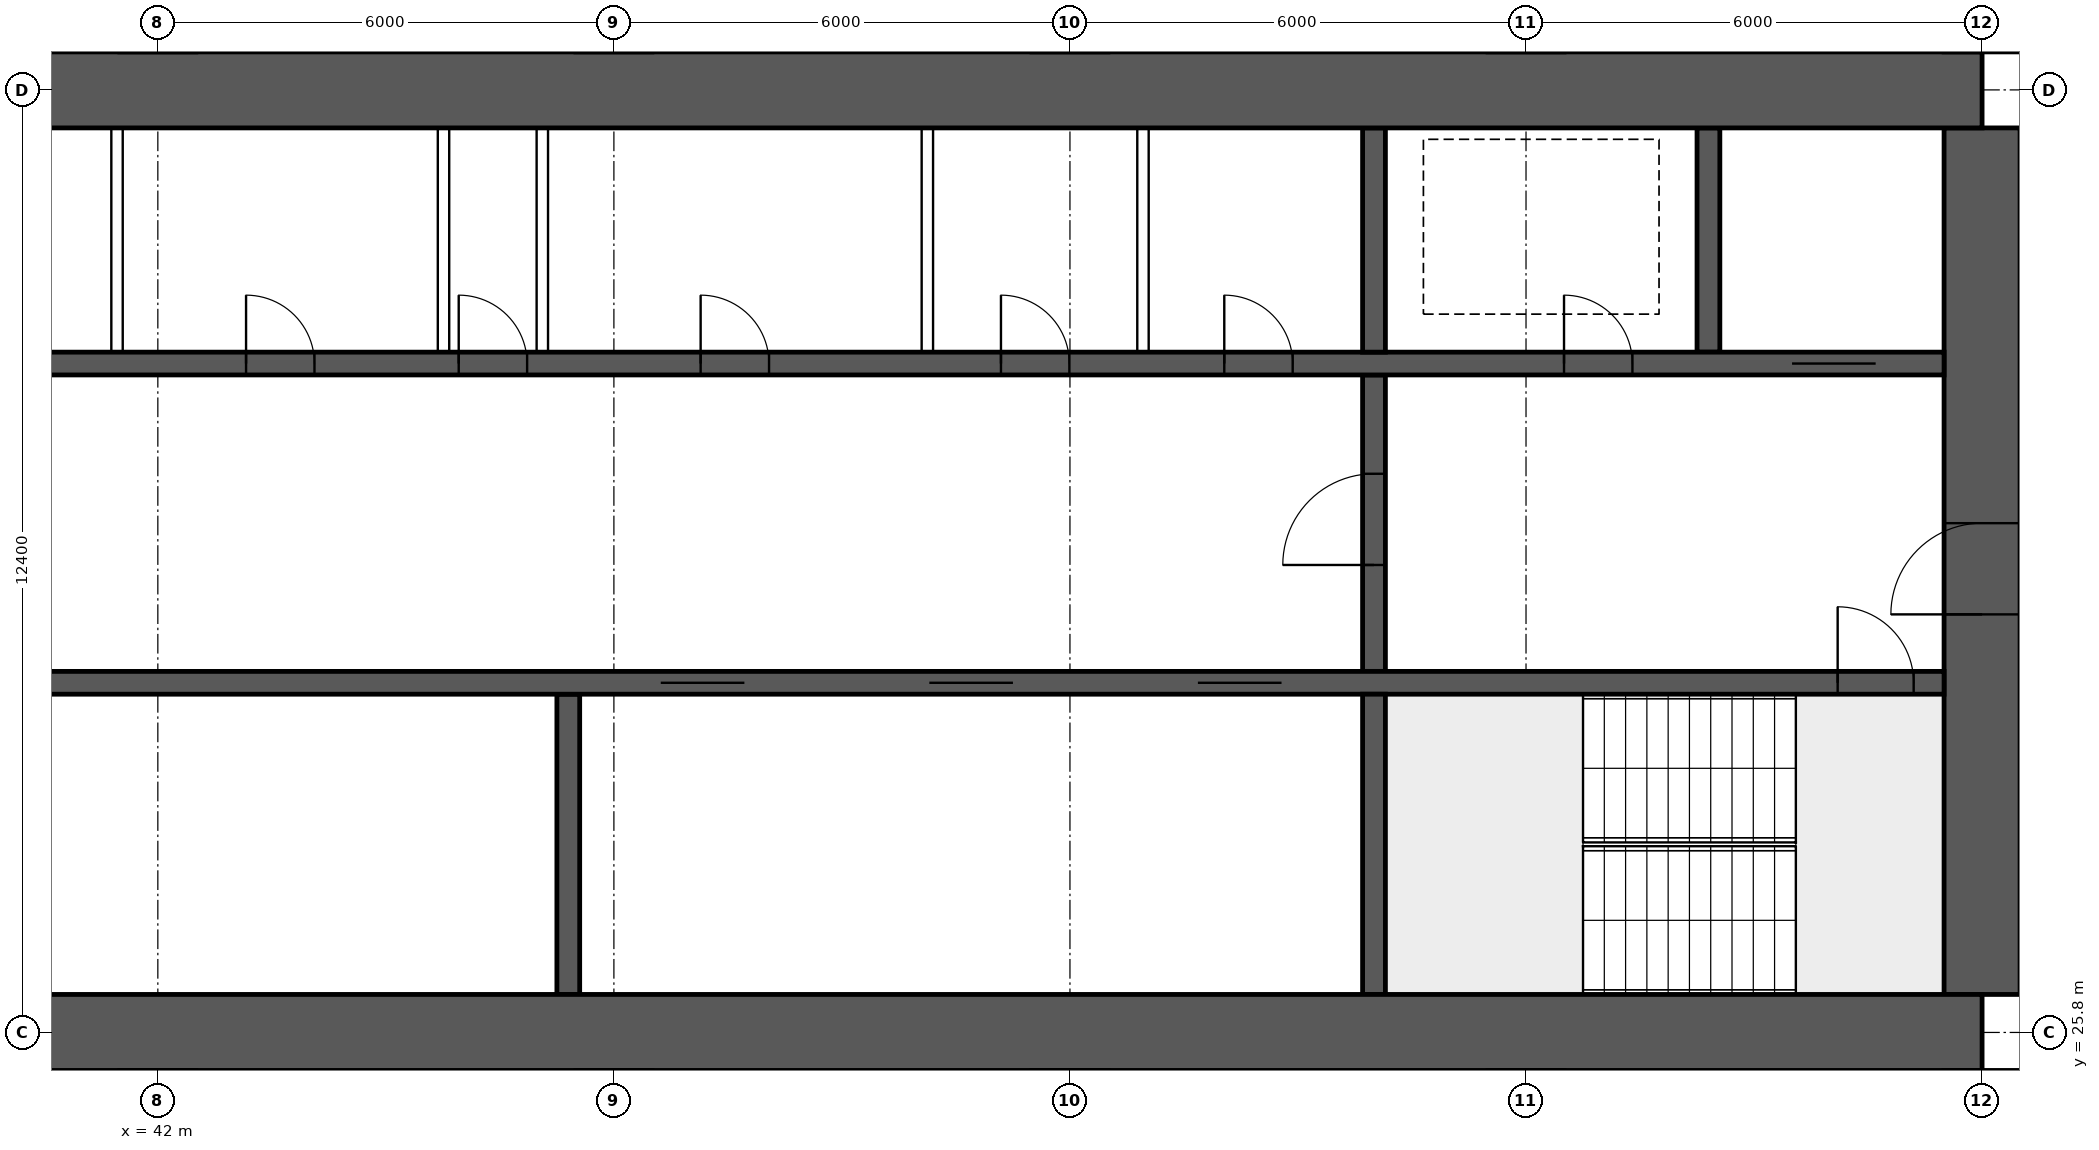
"""IFC4 building model, lengths in metres.
Left out: names, types, materials, properties, quantities, classifications, styles, units other than length and angle.
Written with IfcOpenShell. Run it as: python <this file> out.ifc"""

import sys

from ifc_helpers import new_model, si_unit, direction, frame, frame_2d, origin, place, context, subcontext, project, spatial, rectangle, extrude, element, fill, save


model = new_model("IFC4")
c1 = context("Model", 3, precision=1e-05, world=origin(), true_north=direction((0.0, 1.0)))
c2 = subcontext(c1, "Body", "Model", "MODEL_VIEW")
j1 = project(units=[si_unit("LENGTHUNIT", "METRE"), si_unit("PLANEANGLEUNIT", "RADIAN")], contexts=[c1])
p1 = place(None, origin())
s1 = spatial("IfcSite", under=j1, at=p1, CompositionType="ELEMENT")
p2 = place(p1, origin())
s2 = spatial("IfcBuilding", under=s1, at=p2, CompositionType="ELEMENT")
p3 = place(p2, frame((0.0, 0.0, 42.7)))
s3 = spatial("IfcBuildingStorey", under=s2, at=p3, CompositionType="ELEMENT", Elevation=42.7)
for number, where, z_axis, x_axis in (
    (1, (18.0, 25.8, 0.0), (0.0, 0.0, 1.0), (1.0, 0.0, 0.0)),
    (2, (18.0, 38.2, 0.0), (0.0, 0.0, 1.0), (1.0, 0.0, 0.0)),
):
    element("IfcWall", number, at=place(p3, frame(where, z_axis=z_axis, x_axis=x_axis)), inside=s3, PredefinedType="SHEAR", context=c2, shape_type="SweptSolid", body=[
        extrude(rectangle(XDim=48.0, YDim=1.0, at=frame_2d((24.0, 0.0))), origin(), (0.0, 0.0, 1.0), 3.75),
    ])
p4 = place(p3, frame((66.0, 26.3, 0.0), z_axis=(0.0, 0.0, 1.0), x_axis=(0.0, 1.0, 0.0)))
e3 = element("IfcWall", 3, at=p4, inside=s3, PredefinedType="SHEAR", context=c2, shape_type="SweptSolid", body=[
    extrude(rectangle(XDim=11.4, YDim=1.0, at=frame_2d((5.7, 0.0))), origin(), (0.0, 0.0, 1.0), 3.75),
])
p5 = place(p4, frame((5.0, 0.0, 0.0)))
e4 = element("IfcOpeningElement", 4, at=p5, cuts=e3, PredefinedType="OPENING", context=c2, shape_type="SweptSolid", body=[
    extrude(rectangle(XDim=1.2, YDim=2.1, at=frame_2d((0.6, 1.05))), frame((0.0, 0.51, 0.0), z_axis=(0.0, -1.0, 0.0), x_axis=(1.0, 0.0, 0.0)), (0.0, 0.0, 1.0), 1.02),
])
p6 = place(p3, frame((18.5, 30.4, 0.0), z_axis=(0.0, 0.0, 1.0), x_axis=(1.0, 0.0, 0.0)))
e5 = element("IfcWall", 5, at=p6, inside=s3, PredefinedType="SHEAR", context=c2, shape_type="SweptSolid", body=[
    extrude(rectangle(XDim=47.0, YDim=0.3, at=frame_2d((23.5, 0.0))), origin(), (0.0, 0.0, 1.0), 3.75),
])
p7 = place(p6, frame((0.4, 0.0, 0.0)))
e6 = element("IfcOpeningElement", 6, at=p7, cuts=e5, PredefinedType="OPENING", context=c2, shape_type="SweptSolid", body=[
    extrude(rectangle(XDim=1.0, YDim=2.1, at=frame_2d((0.5, 1.05))), frame((0.0, 0.16, 0.0), z_axis=(0.0, -1.0, 0.0), x_axis=(1.0, 0.0, 0.0)), (0.0, 0.0, 1.0), 0.32),
])
p8 = place(p6, frame((45.6, 0.0, 0.0)))
e7 = element("IfcOpeningElement", 7, at=p8, cuts=e5, PredefinedType="OPENING", context=c2, shape_type="SweptSolid", body=[
    extrude(rectangle(XDim=1.0, YDim=2.1, at=frame_2d((0.5, 1.05))), frame((0.0, 0.16, 0.0), z_axis=(0.0, -1.0, 0.0), x_axis=(1.0, 0.0, 0.0)), (0.0, 0.0, 1.0), 0.32),
])
p9 = place(p6, frame((8.25, 0.0, 0.0)))
e8 = element("IfcOpeningElement", 8, at=p9, cuts=e5, PredefinedType="OPENING", context=c2, shape_type="SweptSolid", body=[
    extrude(rectangle(XDim=1.1, YDim=2.1, at=frame_2d((0.55, 1.05))), frame((0.0, 0.16, 0.0), z_axis=(0.0, -1.0, 0.0), x_axis=(1.0, 0.0, 0.0)), (0.0, 0.0, 1.0), 0.32),
])
p10 = place(p6, frame((10.85, 0.0, 0.0)))
e9 = element("IfcOpeningElement", 9, at=p10, cuts=e5, PredefinedType="OPENING", context=c2, shape_type="SweptSolid", body=[
    extrude(rectangle(XDim=1.1, YDim=2.1, at=frame_2d((0.55, 1.05))), frame((0.0, 0.16, 0.0), z_axis=(0.0, -1.0, 0.0), x_axis=(1.0, 0.0, 0.0)), (0.0, 0.0, 1.0), 0.32),
])
p11 = place(p6, frame((13.45, 0.0, 0.0)))
e10 = element("IfcOpeningElement", 10, at=p11, cuts=e5, PredefinedType="OPENING", context=c2, shape_type="SweptSolid", body=[
    extrude(rectangle(XDim=1.1, YDim=2.1, at=frame_2d((0.55, 1.05))), frame((0.0, 0.16, 0.0), z_axis=(0.0, -1.0, 0.0), x_axis=(1.0, 0.0, 0.0)), (0.0, 0.0, 1.0), 0.32),
])
p12 = place(p6, frame((16.05, 0.0, 0.0)))
e11 = element("IfcOpeningElement", 11, at=p12, cuts=e5, PredefinedType="OPENING", context=c2, shape_type="SweptSolid", body=[
    extrude(rectangle(XDim=1.1, YDim=2.1, at=frame_2d((0.55, 1.05))), frame((0.0, 0.16, 0.0), z_axis=(0.0, -1.0, 0.0), x_axis=(1.0, 0.0, 0.0)), (0.0, 0.0, 1.0), 0.32),
])
p13 = place(p6, frame((30.117, 0.0, 0.0)))
e12 = element("IfcOpeningElement", 12, at=p13, cuts=e5, PredefinedType="OPENING", context=c2, shape_type="SweptSolid", body=[
    extrude(rectangle(XDim=1.1, YDim=2.1, at=frame_2d((0.55, 1.05))), frame((0.0, 0.16, 0.0), z_axis=(0.0, -1.0, 0.0), x_axis=(1.0, 0.0, 0.0)), (0.0, 0.0, 1.0), 0.32),
])
p14 = place(p6, frame((33.65, 0.0, 0.0)))
e13 = element("IfcOpeningElement", 13, at=p14, cuts=e5, PredefinedType="OPENING", context=c2, shape_type="SweptSolid", body=[
    extrude(rectangle(XDim=1.1, YDim=2.1, at=frame_2d((0.55, 1.05))), frame((0.0, 0.16, 0.0), z_axis=(0.0, -1.0, 0.0), x_axis=(1.0, 0.0, 0.0)), (0.0, 0.0, 1.0), 0.32),
])
p15 = place(p6, frame((37.183, 0.0, 0.0)))
e14 = element("IfcOpeningElement", 14, at=p15, cuts=e5, PredefinedType="OPENING", context=c2, shape_type="SweptSolid", body=[
    extrude(rectangle(XDim=1.1, YDim=2.1, at=frame_2d((0.55, 1.05))), frame((0.0, 0.16, 0.0), z_axis=(0.0, -1.0, 0.0), x_axis=(1.0, 0.0, 0.0)), (0.0, 0.0, 1.0), 0.32),
])
p16 = place(p3, frame((18.5, 34.6, 0.0), z_axis=(0.0, 0.0, 1.0), x_axis=(1.0, 0.0, 0.0)))
e15 = element("IfcWall", 15, at=p16, inside=s3, PredefinedType="SHEAR", context=c2, shape_type="SweptSolid", body=[
    extrude(rectangle(XDim=47.0, YDim=0.3, at=frame_2d((23.5, 0.0))), origin(), (0.0, 0.0, 1.0), 3.75),
])
p17 = place(p16, frame((0.9, 0.0, 0.0)))
e16 = element("IfcOpeningElement", 16, at=p17, cuts=e15, PredefinedType="OPENING", context=c2, shape_type="SweptSolid", body=[
    extrude(rectangle(XDim=1.1, YDim=2.1, at=frame_2d((0.55, 1.05))), frame((0.0, 0.16, 0.0), z_axis=(0.0, -1.0, 0.0), x_axis=(1.0, 0.0, 0.0)), (0.0, 0.0, 1.0), 0.32),
])
p18 = place(p16, frame((45.0, 0.0, 0.0)))
e17 = element("IfcOpeningElement", 17, at=p18, cuts=e15, PredefinedType="OPENING", context=c2, shape_type="SweptSolid", body=[
    extrude(rectangle(XDim=1.1, YDim=2.1, at=frame_2d((0.55, 1.05))), frame((0.0, 0.16, 0.0), z_axis=(0.0, -1.0, 0.0), x_axis=(1.0, 0.0, 0.0)), (0.0, 0.0, 1.0), 0.32),
])
p19 = place(p16, frame((4.1, 0.0, 0.0)))
e18 = element("IfcOpeningElement", 18, at=p19, cuts=e15, PredefinedType="OPENING", context=c2, shape_type="SweptSolid", body=[
    extrude(rectangle(XDim=0.9, YDim=2.1, at=frame_2d((0.45, 1.05))), frame((0.0, 0.16, 0.0), z_axis=(0.0, -1.0, 0.0), x_axis=(1.0, 0.0, 0.0)), (0.0, 0.0, 1.0), 0.32),
])
p20 = place(p16, frame((42.0, 0.0, 0.0)))
e19 = element("IfcOpeningElement", 19, at=p20, cuts=e15, PredefinedType="OPENING", context=c2, shape_type="SweptSolid", body=[
    extrude(rectangle(XDim=0.9, YDim=2.1, at=frame_2d((0.45, 1.05))), frame((0.0, 0.16, 0.0), z_axis=(0.0, -1.0, 0.0), x_axis=(1.0, 0.0, 0.0)), (0.0, 0.0, 1.0), 0.32),
])
p21 = place(p16, frame((8.875, 0.0, 0.0)))
e20 = element("IfcOpeningElement", 20, at=p21, cuts=e15, PredefinedType="OPENING", context=c2, shape_type="SweptSolid", body=[
    extrude(rectangle(XDim=0.9, YDim=2.1, at=frame_2d((0.45, 1.05))), frame((0.0, 0.16, 0.0), z_axis=(0.0, -1.0, 0.0), x_axis=(1.0, 0.0, 0.0)), (0.0, 0.0, 1.0), 0.32),
])
p22 = place(p16, frame((12.849, 0.0, 0.0)))
e21 = element("IfcOpeningElement", 21, at=p22, cuts=e15, PredefinedType="OPENING", context=c2, shape_type="SweptSolid", body=[
    extrude(rectangle(XDim=0.9, YDim=2.1, at=frame_2d((0.45, 1.05))), frame((0.0, 0.16, 0.0), z_axis=(0.0, -1.0, 0.0), x_axis=(1.0, 0.0, 0.0)), (0.0, 0.0, 1.0), 0.32),
])
p23 = place(p16, frame((16.496, 0.0, 0.0)))
e22 = element("IfcOpeningElement", 22, at=p23, cuts=e15, PredefinedType="OPENING", context=c2, shape_type="SweptSolid", body=[
    extrude(rectangle(XDim=0.9, YDim=2.1, at=frame_2d((0.45, 1.05))), frame((0.0, 0.16, 0.0), z_axis=(0.0, -1.0, 0.0), x_axis=(1.0, 0.0, 0.0)), (0.0, 0.0, 1.0), 0.32),
])
p24 = place(p16, frame((20.255, 0.0, 0.0)))
e23 = element("IfcOpeningElement", 23, at=p24, cuts=e15, PredefinedType="OPENING", context=c2, shape_type="SweptSolid", body=[
    extrude(rectangle(XDim=0.9, YDim=2.1, at=frame_2d((0.45, 1.05))), frame((0.0, 0.16, 0.0), z_axis=(0.0, -1.0, 0.0), x_axis=(1.0, 0.0, 0.0)), (0.0, 0.0, 1.0), 0.32),
])
p25 = place(p16, frame((24.661, 0.0, 0.0)))
e24 = element("IfcOpeningElement", 24, at=p25, cuts=e15, PredefinedType="OPENING", context=c2, shape_type="SweptSolid", body=[
    extrude(rectangle(XDim=0.9, YDim=2.1, at=frame_2d((0.45, 1.05))), frame((0.0, 0.16, 0.0), z_axis=(0.0, -1.0, 0.0), x_axis=(1.0, 0.0, 0.0)), (0.0, 0.0, 1.0), 0.32),
])
p26 = place(p16, frame((27.458, 0.0, 0.0)))
e25 = element("IfcOpeningElement", 25, at=p26, cuts=e15, PredefinedType="OPENING", context=c2, shape_type="SweptSolid", body=[
    extrude(rectangle(XDim=0.9, YDim=2.1, at=frame_2d((0.45, 1.05))), frame((0.0, 0.16, 0.0), z_axis=(0.0, -1.0, 0.0), x_axis=(1.0, 0.0, 0.0)), (0.0, 0.0, 1.0), 0.32),
])
p27 = place(p16, frame((30.641, 0.0, 0.0)))
e26 = element("IfcOpeningElement", 26, at=p27, cuts=e15, PredefinedType="OPENING", context=c2, shape_type="SweptSolid", body=[
    extrude(rectangle(XDim=0.9, YDim=2.1, at=frame_2d((0.45, 1.05))), frame((0.0, 0.16, 0.0), z_axis=(0.0, -1.0, 0.0), x_axis=(1.0, 0.0, 0.0)), (0.0, 0.0, 1.0), 0.32),
])
p28 = place(p16, frame((34.592, 0.0, 0.0)))
e27 = element("IfcOpeningElement", 27, at=p28, cuts=e15, PredefinedType="OPENING", context=c2, shape_type="SweptSolid", body=[
    extrude(rectangle(XDim=0.9, YDim=2.1, at=frame_2d((0.45, 1.05))), frame((0.0, 0.16, 0.0), z_axis=(0.0, -1.0, 0.0), x_axis=(1.0, 0.0, 0.0)), (0.0, 0.0, 1.0), 0.32),
])
p29 = place(p16, frame((37.53, 0.0, 0.0)))
e28 = element("IfcOpeningElement", 28, at=p29, cuts=e15, PredefinedType="OPENING", context=c2, shape_type="SweptSolid", body=[
    extrude(rectangle(XDim=0.9, YDim=2.1, at=frame_2d((0.45, 1.05))), frame((0.0, 0.16, 0.0), z_axis=(0.0, -1.0, 0.0), x_axis=(1.0, 0.0, 0.0)), (0.0, 0.0, 1.0), 0.32),
])
p30 = place(p3, frame((58.0, 26.3, 0.0), z_axis=(0.0, 0.0, 1.0), x_axis=(0.0, 1.0, 0.0)))
e29 = element("IfcWall", 29, at=p30, inside=s3, PredefinedType="SHEAR", context=c2, shape_type="SweptSolid", body=[
    extrude(rectangle(XDim=3.95, YDim=0.3, at=frame_2d((1.975, 0.0))), origin(), (0.0, 0.0, 1.0), 3.75),
])
p31 = place(p3, frame((58.0, 30.55, 0.0), z_axis=(0.0, 0.0, 1.0), x_axis=(0.0, 1.0, 0.0)))
e30 = element("IfcWall", 30, at=p31, inside=s3, PredefinedType="SHEAR", context=c2, shape_type="SweptSolid", body=[
    extrude(rectangle(XDim=3.9, YDim=0.3, at=frame_2d((1.95, 0.0))), origin(), (0.0, 0.0, 1.0), 3.75),
])
p32 = place(p31, frame((1.4, 0.0, 0.0)))
e31 = element("IfcOpeningElement", 31, at=p32, cuts=e30, PredefinedType="OPENING", context=c2, shape_type="SweptSolid", body=[
    extrude(rectangle(XDim=1.2, YDim=2.1, at=frame_2d((0.6, 1.05))), frame((0.0, 0.16, 0.0), z_axis=(0.0, -1.0, 0.0), x_axis=(1.0, 0.0, 0.0)), (0.0, 0.0, 1.0), 0.32),
])
for number, where, z_axis, x_axis in (
    (32, (62.4, 34.75, 0.0), (0.0, 0.0, 1.0), (0.0, 1.0, 0.0)),
    (33, (58.0, 34.75, 0.0), (0.0, 0.0, 1.0), (0.0, 1.0, 0.0)),
):
    element("IfcWall", number, at=place(p3, frame(where, z_axis=z_axis, x_axis=x_axis)), inside=s3, PredefinedType="SHEAR", context=c2, shape_type="SweptSolid", body=[
        extrude(rectangle(XDim=2.95, YDim=0.3, at=frame_2d((1.475, 0.0))), origin(), (0.0, 0.0, 1.0), 3.75),
    ])
p33 = place(p3, frame((47.4, 26.3, 0.0), z_axis=(0.0, 0.0, 1.0), x_axis=(0.0, 1.0, 0.0)))
e34 = element("IfcWall", 34, at=p33, inside=s3, PredefinedType="SHEAR", context=c2, shape_type="SweptSolid", body=[
    extrude(rectangle(XDim=3.95, YDim=0.3, at=frame_2d((1.975, 0.0))), origin(), (0.0, 0.0, 1.0), 3.75),
])
for number, where, z_axis, x_axis in (
    (35, (41.463, 34.75, 0.0), (0.0, 0.0, 1.0), (0.0, 1.0, 0.0)),
    (36, (45.758, 34.75, 0.0), (0.0, 0.0, 1.0), (0.0, 1.0, 0.0)),
    (37, (47.058, 34.75, 0.0), (0.0, 0.0, 1.0), (0.0, 1.0, 0.0)),
    (38, (52.124, 34.75, 0.0), (0.0, 0.0, 1.0), (0.0, 1.0, 0.0)),
    (39, (54.961, 34.75, 0.0), (0.0, 0.0, 1.0), (0.0, 1.0, 0.0)),
):
    element("IfcWall", number, at=place(p3, frame(where, z_axis=z_axis, x_axis=x_axis)), inside=s3, PredefinedType="SOLIDWALL", context=c2, shape_type="SweptSolid", body=[
        extrude(rectangle(XDim=2.95, YDim=0.15, at=frame_2d((1.475, 0.0))), origin(), (0.0, 0.0, 1.0), 3.5),
    ])
p34 = place(p3, frame((45.48, 14.9, 0.0), z_axis=(0.0, 0.0, 1.0), x_axis=(0.0, 1.0, 0.0)))
e40 = element("IfcWall", 40, at=p34, inside=s3, PredefinedType="PARTITIONING", context=c2, shape_type="SweptSolid", body=[
    extrude(rectangle(XDim=10.4, YDim=0.15, at=frame_2d((5.2, 0.0))), origin(), (0.0, 0.0, 1.0), 3.5),
])
p35 = place(p5, origin())
e41 = element("IfcDoor", 41, at=p35, inside=s3, OperationType="SINGLE_SWING_LEFT", PredefinedType="DOOR", context=c2, shape_type="SweptSolid", body=[
    extrude(rectangle(XDim=1.2, YDim=2.1, at=frame_2d((0.6, 1.05))), frame((0.0, 0.025, 0.0), z_axis=(0.0, -1.0, 0.0), x_axis=(1.0, 0.0, 0.0)), (0.0, 0.0, 1.0), 0.05),
])
fill(e4, e41)
p36 = place(p8, origin())
e42 = element("IfcDoor", 42, at=p36, inside=s3, OperationType="SINGLE_SWING_LEFT", PredefinedType="DOOR", context=c2, shape_type="SweptSolid", body=[
    extrude(rectangle(XDim=1.0, YDim=2.1, at=frame_2d((0.5, 1.05))), frame((0.0, 0.025, 0.0), z_axis=(0.0, -1.0, 0.0), x_axis=(1.0, 0.0, 0.0)), (0.0, 0.0, 1.0), 0.05),
])
fill(e7, e42)
p37 = place(p18, origin())
e43 = element("IfcDoor", 43, at=p37, inside=s3, OperationType="DOUBLE_DOOR_SLIDING", PredefinedType="DOOR", context=c2, shape_type="SweptSolid", body=[
    extrude(rectangle(XDim=1.1, YDim=2.1, at=frame_2d((0.55, 1.05))), frame((0.0, 0.025, 0.0), z_axis=(0.0, -1.0, 0.0), x_axis=(1.0, 0.0, 0.0)), (0.0, 0.0, 1.0), 0.05),
])
fill(e17, e43)
p38 = place(p20, origin())
e44 = element("IfcDoor", 44, at=p38, inside=s3, OperationType="SINGLE_SWING_LEFT", PredefinedType="DOOR", context=c2, shape_type="SweptSolid", body=[
    extrude(rectangle(XDim=0.9, YDim=2.1, at=frame_2d((0.45, 1.05))), frame((0.0, 0.025, 0.0), z_axis=(0.0, -1.0, 0.0), x_axis=(1.0, 0.0, 0.0)), (0.0, 0.0, 1.0), 0.05),
])
fill(e19, e44)
p39 = place(p32, origin())
e45 = element("IfcDoor", 45, at=p39, inside=s3, OperationType="SINGLE_SWING_LEFT", PredefinedType="DOOR", context=c2, shape_type="SweptSolid", body=[
    extrude(rectangle(XDim=1.2, YDim=2.1, at=frame_2d((0.6, 1.05))), frame((0.0, 0.025, 0.0), z_axis=(0.0, -1.0, 0.0), x_axis=(1.0, 0.0, 0.0)), (0.0, 0.0, 1.0), 0.05),
])
fill(e31, e45)
p40 = place(p25, origin())
e46 = element("IfcDoor", 46, at=p40, inside=s3, OperationType="SINGLE_SWING_LEFT", PredefinedType="DOOR", context=c2, shape_type="SweptSolid", body=[
    extrude(rectangle(XDim=0.9, YDim=2.1, at=frame_2d((0.45, 1.05))), frame((0.0, 0.025, 0.0), z_axis=(0.0, -1.0, 0.0), x_axis=(1.0, 0.0, 0.0)), (0.0, 0.0, 1.0), 0.05),
])
fill(e24, e46)
p41 = place(p26, origin())
e47 = element("IfcDoor", 47, at=p41, inside=s3, OperationType="SINGLE_SWING_LEFT", PredefinedType="DOOR", context=c2, shape_type="SweptSolid", body=[
    extrude(rectangle(XDim=0.9, YDim=2.1, at=frame_2d((0.45, 1.05))), frame((0.0, 0.025, 0.0), z_axis=(0.0, -1.0, 0.0), x_axis=(1.0, 0.0, 0.0)), (0.0, 0.0, 1.0), 0.05),
])
fill(e25, e47)
p42 = place(p27, origin())
e48 = element("IfcDoor", 48, at=p42, inside=s3, OperationType="SINGLE_SWING_LEFT", PredefinedType="DOOR", context=c2, shape_type="SweptSolid", body=[
    extrude(rectangle(XDim=0.9, YDim=2.1, at=frame_2d((0.45, 1.05))), frame((0.0, 0.025, 0.0), z_axis=(0.0, -1.0, 0.0), x_axis=(1.0, 0.0, 0.0)), (0.0, 0.0, 1.0), 0.05),
])
fill(e26, e48)
p43 = place(p28, origin())
e49 = element("IfcDoor", 49, at=p43, inside=s3, OperationType="SINGLE_SWING_LEFT", PredefinedType="DOOR", context=c2, shape_type="SweptSolid", body=[
    extrude(rectangle(XDim=0.9, YDim=2.1, at=frame_2d((0.45, 1.05))), frame((0.0, 0.025, 0.0), z_axis=(0.0, -1.0, 0.0), x_axis=(1.0, 0.0, 0.0)), (0.0, 0.0, 1.0), 0.05),
])
fill(e27, e49)
p44 = place(p29, origin())
e50 = element("IfcDoor", 50, at=p44, inside=s3, OperationType="SINGLE_SWING_LEFT", PredefinedType="DOOR", context=c2, shape_type="SweptSolid", body=[
    extrude(rectangle(XDim=0.9, YDim=2.1, at=frame_2d((0.45, 1.05))), frame((0.0, 0.025, 0.0), z_axis=(0.0, -1.0, 0.0), x_axis=(1.0, 0.0, 0.0)), (0.0, 0.0, 1.0), 0.05),
])
fill(e28, e50)
p45 = place(p13, origin())
e51 = element("IfcDoor", 51, at=p45, inside=s3, OperationType="DOUBLE_DOOR_SLIDING", PredefinedType="DOOR", context=c2, shape_type="SweptSolid", body=[
    extrude(rectangle(XDim=1.1, YDim=2.1, at=frame_2d((0.55, 1.05))), frame((0.0, 0.025, 0.0), z_axis=(0.0, -1.0, 0.0), x_axis=(1.0, 0.0, 0.0)), (0.0, 0.0, 1.0), 0.05),
])
fill(e12, e51)
p46 = place(p14, origin())
e52 = element("IfcDoor", 52, at=p46, inside=s3, OperationType="DOUBLE_DOOR_SLIDING", PredefinedType="DOOR", context=c2, shape_type="SweptSolid", body=[
    extrude(rectangle(XDim=1.1, YDim=2.1, at=frame_2d((0.55, 1.05))), frame((0.0, 0.025, 0.0), z_axis=(0.0, -1.0, 0.0), x_axis=(1.0, 0.0, 0.0)), (0.0, 0.0, 1.0), 0.05),
])
fill(e13, e52)
p47 = place(p15, origin())
e53 = element("IfcDoor", 53, at=p47, inside=s3, OperationType="DOUBLE_DOOR_SLIDING", PredefinedType="DOOR", context=c2, shape_type="SweptSolid", body=[
    extrude(rectangle(XDim=1.1, YDim=2.1, at=frame_2d((0.55, 1.05))), frame((0.0, 0.025, 0.0), z_axis=(0.0, -1.0, 0.0), x_axis=(1.0, 0.0, 0.0)), (0.0, 0.0, 1.0), 0.05),
])
fill(e14, e53)
save(model, sys.argv[1])
